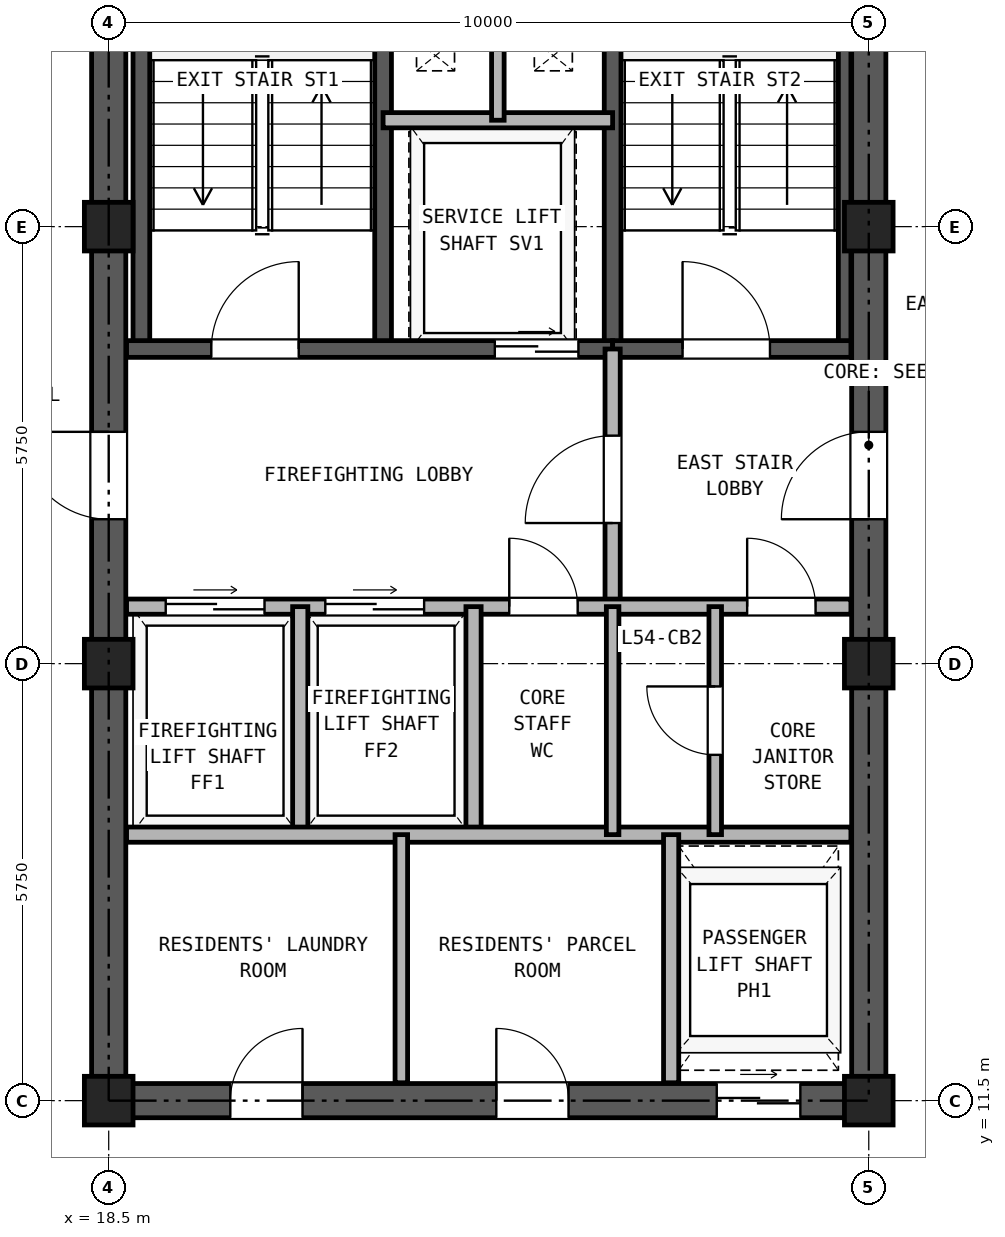
"""IFC4 building model, lengths in metres.
Left out: names, types, materials, properties, quantities, classifications, styles, units other than length and angle.
Written with IfcOpenShell. Run it as: python <this file> out.ifc"""

import sys

from ifc_helpers import new_model, si_unit, direction, frame, frame_2d, origin, origin_2d, place, context, subcontext, project, spatial, rectangle, hollow_rectangle, extrude, source, transform, mapped, element, fill, save


model = new_model("IFC4")
c1 = context("Model", 3, precision=1e-05, world=origin(), true_north=direction((0.0, 1.0)))
c2 = subcontext(c1, "Body", "Model", "MODEL_VIEW")
j1 = project(units=[si_unit("LENGTHUNIT", "METRE"), si_unit("PLANEANGLEUNIT", "RADIAN")], contexts=[c1])
p1 = place(None, origin())
s1 = spatial("IfcSite", under=j1, at=p1, CompositionType="ELEMENT")
p2 = place(p1, origin())
s2 = spatial("IfcBuilding", under=s1, at=p2, CompositionType="ELEMENT")
p3 = place(p2, frame((0.0, 0.0, 193.2)))
s3 = spatial("IfcBuildingStorey", under=s2, at=p3, CompositionType="ELEMENT", Elevation=193.2)
m1 = source(origin(), c2, "Body", "SweptSolid", [
    extrude(hollow_rectangle(XDim=0.64, YDim=0.64, WallThickness=0.035, at=origin_2d()), origin(), (0.0, 0.0, 1.0), 2.95),
])
for number, where, z_axis, x_axis in (
    (1, (18.5, 11.5, 0.0), (0.0, 0.0, 1.0), (1.0, 0.0, 0.0)),
    (2, (18.5, 17.25, 0.0), (0.0, 0.0, 1.0), (1.0, 0.0, 0.0)),
    (3, (18.5, 23.0, 0.0), (0.0, 0.0, 1.0), (1.0, 0.0, 0.0)),
    (4, (28.5, 11.5, 0.0), (0.0, 0.0, 1.0), (1.0, 0.0, 0.0)),
    (5, (28.5, 17.25, 0.0), (0.0, 0.0, 1.0), (1.0, 0.0, 0.0)),
    (6, (28.5, 23.0, 0.0), (0.0, 0.0, 1.0), (1.0, 0.0, 0.0)),
):
    element("IfcColumn", number, at=place(p3, frame(where, z_axis=z_axis, x_axis=x_axis)), inside=s3, PredefinedType="COLUMN", context=c2, shape_type="MappedRepresentation", body=[
        mapped(m1, transform((0.0, 0.0, 0.0), x_axis=(1.0, 0.0, 0.0), y_axis=(0.0, 1.0, 0.0), z_axis=(0.0, 0.0, 1.0), scale=1.0)),
    ])
p4 = place(p3, frame((18.275, 11.5, 0.0), z_axis=(0.0, 0.0, 1.0), x_axis=(1.0, 0.0, 0.0)))
e7 = element("IfcWall", 7, at=p4, inside=s3, PredefinedType="SHEAR", context=c2, shape_type="SweptSolid", body=[
    extrude(rectangle(XDim=10.45, YDim=0.45, at=frame_2d((5.225, 0.0))), origin(), (0.0, 0.0, 1.0), 2.95),
])
p5 = place(p4, frame((1.825, 0.0, 0.0)))
e8 = element("IfcOpeningElement", 8, at=p5, cuts=e7, PredefinedType="OPENING", context=c2, shape_type="SweptSolid", body=[
    extrude(rectangle(XDim=0.95, YDim=2.15, at=frame_2d((0.475, 1.075))), frame((0.0, 0.235, 0.0), z_axis=(0.0, -1.0, 0.0), x_axis=(1.0, 0.0, 0.0)), (0.0, 0.0, 1.0), 0.47),
])
p6 = place(p4, frame((5.325, 0.0, 0.0)))
e9 = element("IfcOpeningElement", 9, at=p6, cuts=e7, PredefinedType="OPENING", context=c2, shape_type="SweptSolid", body=[
    extrude(rectangle(XDim=0.95, YDim=2.15, at=frame_2d((0.475, 1.075))), frame((0.0, 0.235, 0.0), z_axis=(0.0, -1.0, 0.0), x_axis=(1.0, 0.0, 0.0)), (0.0, 0.0, 1.0), 0.47),
])
p7 = place(p4, frame((8.225, 0.0, 0.0)))
e10 = element("IfcOpeningElement", 10, at=p7, cuts=e7, PredefinedType="OPENING", context=c2, shape_type="SweptSolid", body=[
    extrude(rectangle(XDim=1.1, YDim=2.25, at=frame_2d((0.55, 1.125))), frame((0.0, 0.235, 0.0), z_axis=(0.0, -1.0, 0.0), x_axis=(1.0, 0.0, 0.0)), (0.0, 0.0, 1.0), 0.47),
])
p8 = place(p3, frame((18.5, 11.725, 0.0), z_axis=(0.0, 0.0, 1.0), x_axis=(0.0, 1.0, 0.0)))
e11 = element("IfcWall", 11, at=p8, inside=s3, PredefinedType="SHEAR", context=c2, shape_type="SweptSolid", body=[
    extrude(rectangle(XDim=16.8, YDim=0.45, at=frame_2d((8.4, 0.0))), origin(), (0.0, 0.0, 1.0), 2.95),
])
p9 = place(p8, frame((7.425, 0.0, 0.0)))
e12 = element("IfcOpeningElement", 12, at=p9, cuts=e11, PredefinedType="OPENING", context=c2, shape_type="SweptSolid", body=[
    extrude(rectangle(XDim=1.15, YDim=2.2, at=frame_2d((0.575, 1.1))), frame((0.0, 0.235, 0.0), z_axis=(0.0, -1.0, 0.0), x_axis=(1.0, 0.0, 0.0)), (0.0, 0.0, 1.0), 0.47),
])
p10 = place(p3, frame((28.5, 11.725, 0.0), z_axis=(0.0, 0.0, 1.0), x_axis=(0.0, 1.0, 0.0)))
e13 = element("IfcWall", 13, at=p10, inside=s3, PredefinedType="SHEAR", context=c2, shape_type="SweptSolid", body=[
    extrude(rectangle(XDim=16.8, YDim=0.45, at=frame_2d((8.4, 0.0))), origin(), (0.0, 0.0, 1.0), 2.95),
])
p11 = place(p10, frame((7.425, 0.0, 0.0)))
e14 = element("IfcOpeningElement", 14, at=p11, cuts=e13, PredefinedType="OPENING", context=c2, shape_type="SweptSolid", body=[
    extrude(rectangle(XDim=1.15, YDim=2.2, at=frame_2d((0.575, 1.1))), frame((0.0, 0.235, 0.0), z_axis=(0.0, -1.0, 0.0), x_axis=(1.0, 0.0, 0.0)), (0.0, 0.0, 1.0), 0.47),
])
for number, where, z_axis, x_axis in (
    (15, (18.93, 21.39, 0.0), (0.0, 0.0, 1.0), (0.0, 1.0, 0.0)),
    (16, (22.11, 21.39, 0.0), (0.0, 0.0, 1.0), (0.0, 1.0, 0.0)),
    (17, (25.13, 21.39, 0.0), (0.0, 0.0, 1.0), (0.0, 1.0, 0.0)),
):
    element("IfcWall", number, at=place(p3, frame(where, z_axis=z_axis, x_axis=x_axis)), inside=s3, PredefinedType="SOLIDWALL", context=c2, shape_type="SweptSolid", body=[
        extrude(rectangle(XDim=7.11, YDim=0.22, at=frame_2d((3.555, 0.0))), origin(), (0.0, 0.0, 1.0), 2.95),
    ])
p12 = place(p3, frame((28.183, 21.39, 0.0), z_axis=(0.0, 0.0, 1.0), x_axis=(0.0, 1.0, 0.0)))
e18 = element("IfcWall", 18, at=p12, inside=s3, PredefinedType="PARTITIONING", context=c2, shape_type="SweptSolid", body=[
    extrude(rectangle(XDim=6.945, YDim=0.165, at=frame_2d((3.473, 0.0))), origin(), (0.0, 0.0, 1.0), 2.95),
])
p13 = place(p3, frame((18.735, 21.39, 0.0), z_axis=(0.0, 0.0, 1.0), x_axis=(1.0, 0.0, 0.0)))
e19 = element("IfcWall", 19, at=p13, inside=s3, PredefinedType="SOLIDWALL", context=c2, shape_type="SweptSolid", body=[
    extrude(rectangle(XDim=6.395, YDim=0.22, at=frame_2d((3.197, 0.0))), origin(), (0.0, 0.0, 1.0), 2.95),
])
p14 = place(p13, frame((1.115, 0.0, 0.0)))
e20 = element("IfcOpeningElement", 20, at=p14, cuts=e19, PredefinedType="OPENING", context=c2, shape_type="SweptSolid", body=[
    extrude(rectangle(XDim=1.15, YDim=2.2, at=frame_2d((0.575, 1.1))), frame((0.0, 0.12, 0.0), z_axis=(0.0, -1.0, 0.0), x_axis=(1.0, 0.0, 0.0)), (0.0, 0.0, 1.0), 0.24),
])
p15 = place(p13, frame((4.845, 0.0, 0.0)))
e21 = element("IfcOpeningElement", 21, at=p15, cuts=e19, PredefinedType="OPENING", context=c2, shape_type="SweptSolid", body=[
    extrude(rectangle(XDim=1.1, YDim=2.25, at=frame_2d((0.55, 1.125))), frame((0.0, 0.12, 0.0), z_axis=(0.0, -1.0, 0.0), x_axis=(1.0, 0.0, 0.0)), (0.0, 0.0, 1.0), 0.24),
])
p16 = place(p3, frame((25.13, 21.39, 0.0), z_axis=(0.0, 0.0, 1.0), x_axis=(1.0, 0.0, 0.0)))
e22 = element("IfcWall", 22, at=p16, inside=s3, PredefinedType="SOLIDWALL", context=c2, shape_type="SweptSolid", body=[
    extrude(rectangle(XDim=3.135, YDim=0.22, at=frame_2d((1.567, 0.0))), origin(), (0.0, 0.0, 1.0), 2.95),
])
p17 = place(p16, frame((0.92, 0.0, 0.0)))
e23 = element("IfcOpeningElement", 23, at=p17, cuts=e22, PredefinedType="OPENING", context=c2, shape_type="SweptSolid", body=[
    extrude(rectangle(XDim=1.15, YDim=2.2, at=frame_2d((0.575, 1.1))), frame((0.0, 0.12, 0.0), z_axis=(0.0, -1.0, 0.0), x_axis=(1.0, 0.0, 0.0)), (0.0, 0.0, 1.0), 0.24),
])
p18 = place(p3, frame((22.11, 24.4, 0.0), z_axis=(0.0, 0.0, 1.0), x_axis=(1.0, 0.0, 0.0)))
e24 = element("IfcWall", 24, at=p18, inside=s3, PredefinedType="PARTITIONING", context=c2, shape_type="SweptSolid", body=[
    extrude(rectangle(XDim=3.02, YDim=0.2, at=frame_2d((1.51, 0.0))), origin(), (0.0, 0.0, 1.0), 2.95),
])
p19 = place(p3, frame((23.62, 24.4, 0.0), z_axis=(0.0, 0.0, 1.0), x_axis=(0.0, 1.0, 0.0)))
e25 = element("IfcWall", 25, at=p19, inside=s3, PredefinedType="PARTITIONING", context=c2, shape_type="SweptSolid", body=[
    extrude(rectangle(XDim=4.115, YDim=0.165, at=frame_2d((2.058, 0.0))), origin(), (0.0, 0.0, 1.0), 2.95),
])
p20 = place(p3, frame((25.13, 18.0, 0.0), z_axis=(0.0, 0.0, 1.0), x_axis=(0.0, 1.0, 0.0)))
e26 = element("IfcWall", 26, at=p20, inside=s3, PredefinedType="PARTITIONING", context=c2, shape_type="SweptSolid", body=[
    extrude(rectangle(XDim=3.39, YDim=0.2, at=frame_2d((1.695, 0.0))), origin(), (0.0, 0.0, 1.0), 2.95),
])
p21 = place(p20, frame((1.1, 0.0, 0.0)))
e27 = element("IfcOpeningElement", 27, at=p21, cuts=e26, PredefinedType="OPENING", context=c2, shape_type="SweptSolid", body=[
    extrude(rectangle(XDim=1.15, YDim=2.2, at=frame_2d((0.575, 1.1))), frame((0.0, 0.11, 0.0), z_axis=(0.0, -1.0, 0.0), x_axis=(1.0, 0.0, 0.0)), (0.0, 0.0, 1.0), 0.22),
])
p22 = place(p3, frame((18.735, 18.0, 0.0), z_axis=(0.0, 0.0, 1.0), x_axis=(1.0, 0.0, 0.0)))
e28 = element("IfcWall", 28, at=p22, inside=s3, PredefinedType="PARTITIONING", context=c2, shape_type="SweptSolid", body=[
    extrude(rectangle(XDim=9.53, YDim=0.2, at=frame_2d((4.765, 0.0))), origin(), (0.0, 0.0, 1.0), 2.95),
])
p23 = place(p22, frame((0.515, 0.0, 0.0)))
e29 = element("IfcOpeningElement", 29, at=p23, cuts=e28, PredefinedType="OPENING", context=c2, shape_type="SweptSolid", body=[
    extrude(rectangle(XDim=1.3, YDim=2.3, at=frame_2d((0.65, 1.15))), frame((0.0, 0.11, 0.0), z_axis=(0.0, -1.0, 0.0), x_axis=(1.0, 0.0, 0.0)), (0.0, 0.0, 1.0), 0.22),
])
p24 = place(p22, frame((2.615, 0.0, 0.0)))
e30 = element("IfcOpeningElement", 30, at=p24, cuts=e28, PredefinedType="OPENING", context=c2, shape_type="SweptSolid", body=[
    extrude(rectangle(XDim=1.3, YDim=2.3, at=frame_2d((0.65, 1.15))), frame((0.0, 0.11, 0.0), z_axis=(0.0, -1.0, 0.0), x_axis=(1.0, 0.0, 0.0)), (0.0, 0.0, 1.0), 0.22),
])
p25 = place(p22, frame((5.035, 0.0, 0.0)))
e31 = element("IfcOpeningElement", 31, at=p25, cuts=e28, PredefinedType="OPENING", context=c2, shape_type="SweptSolid", body=[
    extrude(rectangle(XDim=0.9, YDim=2.05, at=frame_2d((0.45, 1.025))), frame((0.0, 0.11, 0.0), z_axis=(0.0, -1.0, 0.0), x_axis=(1.0, 0.0, 0.0)), (0.0, 0.0, 1.0), 0.22),
])
p26 = place(p22, frame((8.165, 0.0, 0.0)))
e32 = element("IfcOpeningElement", 32, at=p26, cuts=e28, PredefinedType="OPENING", context=c2, shape_type="SweptSolid", body=[
    extrude(rectangle(XDim=0.9, YDim=2.05, at=frame_2d((0.45, 1.025))), frame((0.0, 0.11, 0.0), z_axis=(0.0, -1.0, 0.0), x_axis=(1.0, 0.0, 0.0)), (0.0, 0.0, 1.0), 0.22),
])
for number, where, z_axis, x_axis in (
    (33, (21.02, 15.0, 0.0), (0.0, 0.0, 1.0), (0.0, 1.0, 0.0)),
    (34, (23.3, 15.0, 0.0), (0.0, 0.0, 1.0), (0.0, 1.0, 0.0)),
):
    element("IfcWall", number, at=place(p3, frame(where, z_axis=z_axis, x_axis=x_axis)), inside=s3, PredefinedType="PARTITIONING", context=c2, shape_type="SweptSolid", body=[
        extrude(rectangle(XDim=3.0, YDim=0.2, at=frame_2d((1.5, 0.0))), origin(), (0.0, 0.0, 1.0), 2.95),
    ])
p27 = place(p3, frame((18.735, 15.0, 0.0), z_axis=(0.0, 0.0, 1.0), x_axis=(1.0, 0.0, 0.0)))
e35 = element("IfcWall", 35, at=p27, inside=s3, PredefinedType="PARTITIONING", context=c2, shape_type="SweptSolid", body=[
    extrude(rectangle(XDim=9.53, YDim=0.2, at=frame_2d((4.765, 0.0))), origin(), (0.0, 0.0, 1.0), 2.95),
])
p28 = place(p3, frame((25.13, 15.0, 0.0), z_axis=(0.0, 0.0, 1.0), x_axis=(0.0, 1.0, 0.0)))
e36 = element("IfcWall", 36, at=p28, inside=s3, PredefinedType="PARTITIONING", context=c2, shape_type="SweptSolid", body=[
    extrude(rectangle(XDim=3.0, YDim=0.165, at=frame_2d((1.5, 0.0))), origin(), (0.0, 0.0, 1.0), 2.95),
])
p29 = place(p3, frame((26.48, 15.0, 0.0), z_axis=(0.0, 0.0, 1.0), x_axis=(0.0, 1.0, 0.0)))
e37 = element("IfcWall", 37, at=p29, inside=s3, PredefinedType="PARTITIONING", context=c2, shape_type="SweptSolid", body=[
    extrude(rectangle(XDim=3.0, YDim=0.165, at=frame_2d((1.5, 0.0))), origin(), (0.0, 0.0, 1.0), 2.95),
])
p30 = place(p29, frame((1.05, 0.0, 0.0)))
e38 = element("IfcOpeningElement", 38, at=p30, cuts=e37, PredefinedType="OPENING", context=c2, shape_type="SweptSolid", body=[
    extrude(rectangle(XDim=0.9, YDim=2.05, at=frame_2d((0.45, 1.025))), frame((0.0, 0.093, 0.0), z_axis=(0.0, -1.0, 0.0), x_axis=(1.0, 0.0, 0.0)), (0.0, 0.0, 1.0), 0.185),
])
p31 = place(p3, frame((22.35, 11.735, 0.0), z_axis=(0.0, 0.0, 1.0), x_axis=(0.0, 1.0, 0.0)))
e39 = element("IfcWall", 39, at=p31, inside=s3, PredefinedType="PARTITIONING", context=c2, shape_type="SweptSolid", body=[
    extrude(rectangle(XDim=3.265, YDim=0.165, at=frame_2d((1.632, 0.0))), origin(), (0.0, 0.0, 1.0), 2.95),
])
p32 = place(p3, frame((25.9, 11.735, 0.0), z_axis=(0.0, 0.0, 1.0), x_axis=(0.0, 1.0, 0.0)))
e40 = element("IfcWall", 40, at=p32, inside=s3, PredefinedType="PARTITIONING", context=c2, shape_type="SweptSolid", body=[
    extrude(rectangle(XDim=3.265, YDim=0.2, at=frame_2d((1.632, 0.0))), origin(), (0.0, 0.0, 1.0), 2.95),
])
p33 = place(p14, frame((1.15, 0.0, 0.0), z_axis=(0.0, 0.0, 1.0), x_axis=(-1.0, 0.0, 0.0)))
e41 = element("IfcDoor", 41, at=p33, inside=s3, OperationType="SINGLE_SWING_RIGHT", PredefinedType="DOOR", context=c2, shape_type="SweptSolid", body=[
    extrude(rectangle(XDim=1.15, YDim=2.2, at=frame_2d((0.575, 1.1))), frame((0.0, 0.025, 0.0), z_axis=(0.0, -1.0, 0.0), x_axis=(1.0, 0.0, 0.0)), (0.0, 0.0, 1.0), 0.05),
])
fill(e20, e41)
p34 = place(p17, frame((1.15, 0.0, 0.0), z_axis=(0.0, 0.0, 1.0), x_axis=(-1.0, 0.0, 0.0)))
e42 = element("IfcDoor", 42, at=p34, inside=s3, OperationType="SINGLE_SWING_LEFT", PredefinedType="DOOR", context=c2, shape_type="SweptSolid", body=[
    extrude(rectangle(XDim=1.15, YDim=2.2, at=frame_2d((0.575, 1.1))), frame((0.0, 0.025, 0.0), z_axis=(0.0, -1.0, 0.0), x_axis=(1.0, 0.0, 0.0)), (0.0, 0.0, 1.0), 0.05),
])
fill(e23, e42)
p35 = place(p15, frame((1.1, 0.0, 0.0), z_axis=(0.0, 0.0, 1.0), x_axis=(-1.0, 0.0, 0.0)))
e43 = element("IfcDoor", 43, at=p35, inside=s3, OperationType="DOUBLE_DOOR_SLIDING", PredefinedType="DOOR", context=c2, shape_type="SweptSolid", body=[
    extrude(rectangle(XDim=1.1, YDim=2.25, at=frame_2d((0.55, 1.125))), frame((0.0, 0.025, 0.0), z_axis=(0.0, -1.0, 0.0), x_axis=(1.0, 0.0, 0.0)), (0.0, 0.0, 1.0), 0.05),
])
fill(e21, e43)
p36 = place(p21, origin())
e44 = element("IfcDoor", 44, at=p36, inside=s3, OperationType="SINGLE_SWING_LEFT", PredefinedType="DOOR", context=c2, shape_type="SweptSolid", body=[
    extrude(rectangle(XDim=1.15, YDim=2.2, at=frame_2d((0.575, 1.1))), frame((0.0, 0.025, 0.0), z_axis=(0.0, -1.0, 0.0), x_axis=(1.0, 0.0, 0.0)), (0.0, 0.0, 1.0), 0.05),
])
fill(e27, e44)
p37 = place(p23, origin())
e45 = element("IfcDoor", 45, at=p37, inside=s3, OperationType="DOUBLE_DOOR_SLIDING", PredefinedType="DOOR", context=c2, shape_type="SweptSolid", body=[
    extrude(rectangle(XDim=1.3, YDim=2.3, at=frame_2d((0.65, 1.15))), frame((0.0, 0.025, 0.0), z_axis=(0.0, -1.0, 0.0), x_axis=(1.0, 0.0, 0.0)), (0.0, 0.0, 1.0), 0.05),
])
fill(e29, e45)
p38 = place(p24, origin())
e46 = element("IfcDoor", 46, at=p38, inside=s3, OperationType="DOUBLE_DOOR_SLIDING", PredefinedType="DOOR", context=c2, shape_type="SweptSolid", body=[
    extrude(rectangle(XDim=1.3, YDim=2.3, at=frame_2d((0.65, 1.15))), frame((0.0, 0.025, 0.0), z_axis=(0.0, -1.0, 0.0), x_axis=(1.0, 0.0, 0.0)), (0.0, 0.0, 1.0), 0.05),
])
fill(e30, e46)
p39 = place(p25, frame((0.9, 0.0, 0.0), z_axis=(0.0, 0.0, 1.0), x_axis=(-1.0, 0.0, 0.0)))
e47 = element("IfcDoor", 47, at=p39, inside=s3, OperationType="SINGLE_SWING_LEFT", PredefinedType="DOOR", context=c2, shape_type="SweptSolid", body=[
    extrude(rectangle(XDim=0.9, YDim=2.05, at=frame_2d((0.45, 1.025))), frame((0.0, 0.025, 0.0), z_axis=(0.0, -1.0, 0.0), x_axis=(1.0, 0.0, 0.0)), (0.0, 0.0, 1.0), 0.05),
])
fill(e31, e47)
p40 = place(p30, origin())
e48 = element("IfcDoor", 48, at=p40, inside=s3, OperationType="SINGLE_SWING_RIGHT", PredefinedType="DOOR", context=c2, shape_type="SweptSolid", body=[
    extrude(rectangle(XDim=0.9, YDim=2.05, at=frame_2d((0.45, 1.025))), frame((0.0, 0.025, 0.0), z_axis=(0.0, -1.0, 0.0), x_axis=(1.0, 0.0, 0.0)), (0.0, 0.0, 1.0), 0.05),
])
fill(e38, e48)
p41 = place(p26, frame((0.9, 0.0, 0.0), z_axis=(0.0, 0.0, 1.0), x_axis=(-1.0, 0.0, 0.0)))
e49 = element("IfcDoor", 49, at=p41, inside=s3, OperationType="SINGLE_SWING_LEFT", PredefinedType="DOOR", context=c2, shape_type="SweptSolid", body=[
    extrude(rectangle(XDim=0.9, YDim=2.05, at=frame_2d((0.45, 1.025))), frame((0.0, 0.025, 0.0), z_axis=(0.0, -1.0, 0.0), x_axis=(1.0, 0.0, 0.0)), (0.0, 0.0, 1.0), 0.05),
])
fill(e32, e49)
p42 = place(p9, frame((1.15, 0.0, 0.0), z_axis=(0.0, 0.0, 1.0), x_axis=(-1.0, 0.0, 0.0)))
e50 = element("IfcDoor", 50, at=p42, inside=s3, OperationType="SINGLE_SWING_RIGHT", PredefinedType="DOOR", context=c2, shape_type="SweptSolid", body=[
    extrude(rectangle(XDim=1.15, YDim=2.2, at=frame_2d((0.575, 1.1))), frame((0.0, 0.025, 0.0), z_axis=(0.0, -1.0, 0.0), x_axis=(1.0, 0.0, 0.0)), (0.0, 0.0, 1.0), 0.05),
])
fill(e12, e50)
p43 = place(p11, origin())
e51 = element("IfcDoor", 51, at=p43, inside=s3, OperationType="SINGLE_SWING_LEFT", PredefinedType="DOOR", context=c2, shape_type="SweptSolid", body=[
    extrude(rectangle(XDim=1.15, YDim=2.2, at=frame_2d((0.575, 1.1))), frame((0.0, 0.025, 0.0), z_axis=(0.0, -1.0, 0.0), x_axis=(1.0, 0.0, 0.0)), (0.0, 0.0, 1.0), 0.05),
])
fill(e14, e51)
p44 = place(p5, frame((0.95, 0.0, 0.0), z_axis=(0.0, 0.0, 1.0), x_axis=(-1.0, 0.0, 0.0)))
e52 = element("IfcDoor", 52, at=p44, inside=s3, OperationType="SINGLE_SWING_RIGHT", PredefinedType="DOOR", context=c2, shape_type="SweptSolid", body=[
    extrude(rectangle(XDim=0.95, YDim=2.15, at=frame_2d((0.475, 1.075))), frame((0.0, 0.025, 0.0), z_axis=(0.0, -1.0, 0.0), x_axis=(1.0, 0.0, 0.0)), (0.0, 0.0, 1.0), 0.05),
])
fill(e8, e52)
p45 = place(p6, frame((0.95, 0.0, 0.0), z_axis=(0.0, 0.0, 1.0), x_axis=(-1.0, 0.0, 0.0)))
e53 = element("IfcDoor", 53, at=p45, inside=s3, OperationType="SINGLE_SWING_LEFT", PredefinedType="DOOR", context=c2, shape_type="SweptSolid", body=[
    extrude(rectangle(XDim=0.95, YDim=2.15, at=frame_2d((0.475, 1.075))), frame((0.0, 0.025, 0.0), z_axis=(0.0, -1.0, 0.0), x_axis=(1.0, 0.0, 0.0)), (0.0, 0.0, 1.0), 0.05),
])
fill(e9, e53)
p46 = place(p7, frame((1.1, 0.0, 0.0), z_axis=(0.0, 0.0, 1.0), x_axis=(-1.0, 0.0, 0.0)))
e54 = element("IfcDoor", 54, at=p46, inside=s3, OperationType="DOUBLE_DOOR_SLIDING", PredefinedType="DOOR", context=c2, shape_type="SweptSolid", body=[
    extrude(rectangle(XDim=1.1, YDim=2.25, at=frame_2d((0.55, 1.125))), frame((0.0, 0.025, 0.0), z_axis=(0.0, -1.0, 0.0), x_axis=(1.0, 0.0, 0.0)), (0.0, 0.0, 1.0), 0.05),
])
fill(e10, e54)
save(model, sys.argv[1])
